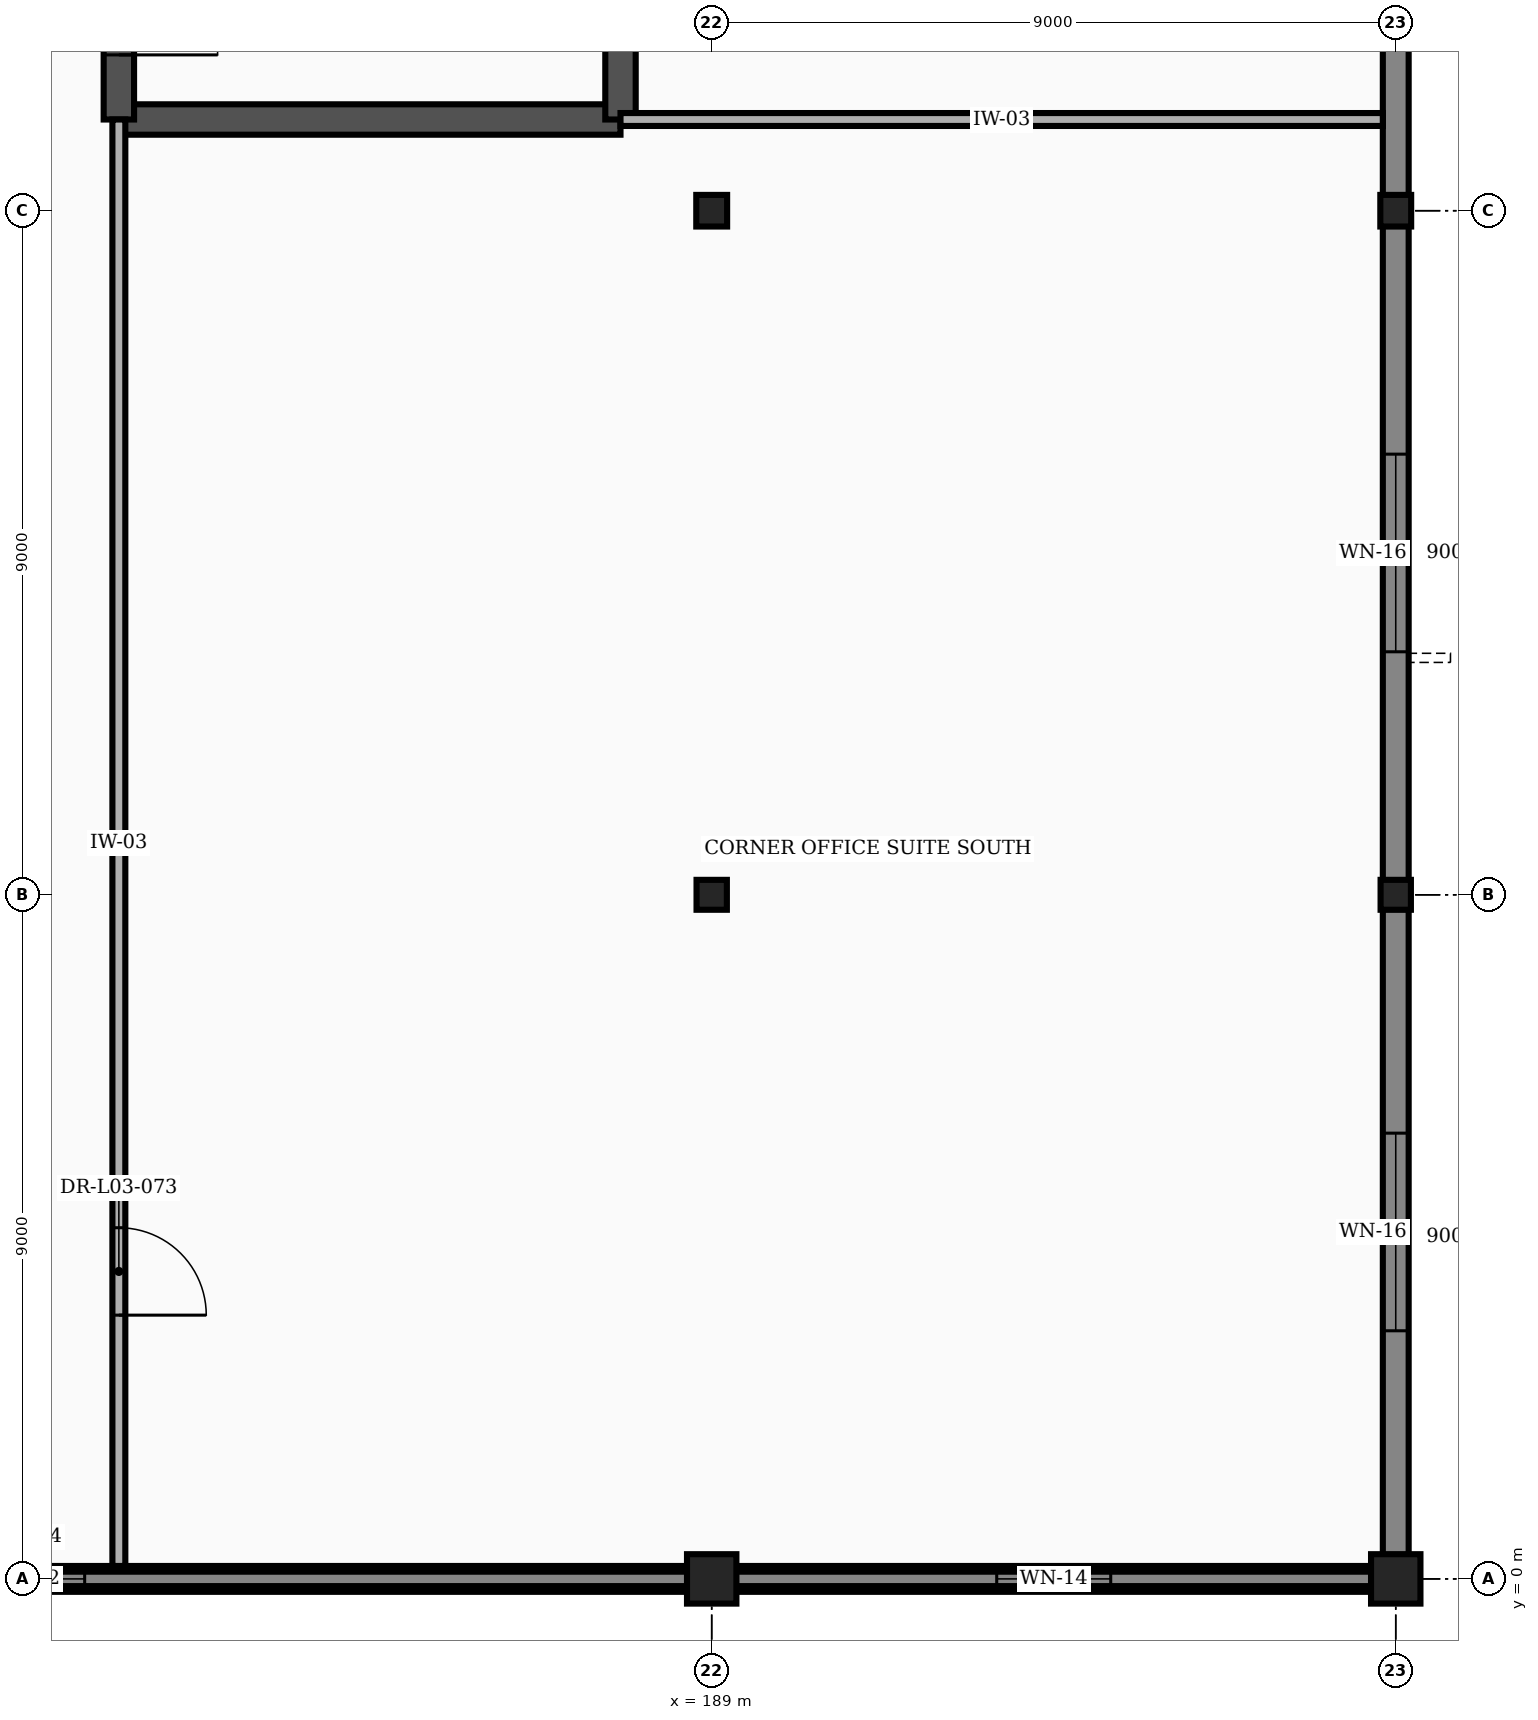
"""IFC4 building model, lengths in metres.
Left out: names, types, materials, properties, quantities, classifications, styles, units other than length and angle.
Written with IfcOpenShell. Run it as: python <this file> out.ifc"""

import sys

from ifc_helpers import new_model, si_unit, direction, frame, frame_2d, origin, origin_2d, place, context, subcontext, project, spatial, rectangle, i_section, extrude, element, fill, save


model = new_model("IFC4")
c1 = context("Model", 3, precision=1e-05, world=origin(), true_north=direction((0.0, 1.0)))
c2 = subcontext(c1, "Body", "Model", "MODEL_VIEW")
j1 = project(units=[si_unit("LENGTHUNIT", "METRE"), si_unit("PLANEANGLEUNIT", "RADIAN")], contexts=[c1])
p1 = place(None, origin())
s1 = spatial("IfcSite", under=j1, at=p1, CompositionType="ELEMENT")
p2 = place(p1, origin())
s2 = spatial("IfcBuilding", under=s1, at=p2, CompositionType="ELEMENT")
p3 = place(p2, frame((0.0, 0.0, 16.8)))
s3 = spatial("IfcBuildingStorey", under=s2, at=p3, CompositionType="ELEMENT", Elevation=16.8)
p4 = place(p3, frame((189.0, 0.0, 0.0), z_axis=(0.0, 0.0, 1.0), x_axis=(1.0, 0.0, 0.0)))
e1 = element("IfcColumn", 1, at=p4, inside=s3, PredefinedType="COLUMN", context=c2, shape_type="SweptSolid", body=[
    extrude(rectangle(XDim=0.65, YDim=0.65, at=origin_2d()), origin(), (0.0, 0.0, 1.0), 4.8),
])
p5 = place(p3, frame((189.0, 9.0, 0.0), z_axis=(0.0, 0.0, 1.0), x_axis=(1.0, 0.0, 0.0)))
e2 = element("IfcColumn", 2, at=p5, inside=s3, PredefinedType="COLUMN", context=c2, shape_type="SweptSolid", body=[
    extrude(i_section(OverallWidth=0.399, OverallDepth=0.394, WebThickness=0.023, FlangeThickness=0.037, at=origin_2d()), origin(), (0.0, 0.0, 1.0), 4.8),
])
p6 = place(p3, frame((189.0, 18.0, 0.0), z_axis=(0.0, 0.0, 1.0), x_axis=(1.0, 0.0, 0.0)))
e3 = element("IfcColumn", 3, at=p6, inside=s3, PredefinedType="COLUMN", context=c2, shape_type="SweptSolid", body=[
    extrude(i_section(OverallWidth=0.406, OverallDepth=0.416, WebThickness=0.03, FlangeThickness=0.048, at=origin_2d()), origin(), (0.0, 0.0, 1.0), 4.8),
])
p7 = place(p3, frame((198.0, 0.0, 0.0), z_axis=(0.0, 0.0, 1.0), x_axis=(1.0, 0.0, 0.0)))
e4 = element("IfcColumn", 4, at=p7, inside=s3, PredefinedType="COLUMN", context=c2, shape_type="SweptSolid", body=[
    extrude(rectangle(XDim=0.65, YDim=0.65, at=origin_2d()), origin(), (0.0, 0.0, 1.0), 4.8),
])
p8 = place(p3, frame((198.0, 9.0, 0.0), z_axis=(0.0, 0.0, 1.0), x_axis=(1.0, 0.0, 0.0)))
e5 = element("IfcColumn", 5, at=p8, inside=s3, PredefinedType="COLUMN", context=c2, shape_type="SweptSolid", body=[
    extrude(i_section(OverallWidth=0.399, OverallDepth=0.394, WebThickness=0.023, FlangeThickness=0.037, at=origin_2d()), origin(), (0.0, 0.0, 1.0), 4.8),
])
p9 = place(p3, frame((198.0, 18.0, 0.0), z_axis=(0.0, 0.0, 1.0), x_axis=(1.0, 0.0, 0.0)))
e6 = element("IfcColumn", 6, at=p9, inside=s3, PredefinedType="COLUMN", context=c2, shape_type="SweptSolid", body=[
    extrude(i_section(OverallWidth=0.406, OverallDepth=0.416, WebThickness=0.03, FlangeThickness=0.048, at=origin_2d()), origin(), (0.0, 0.0, 1.0), 4.8),
])
p10 = place(p3, frame((171.317, 0.0, 0.0), z_axis=(0.0, 0.0, 1.0), x_axis=(1.0, 0.0, 0.0)))
e7 = element("IfcWall", 7, at=p10, inside=s3, PredefinedType="STANDARD", context=c2, shape_type="SweptSolid", body=[
    extrude(rectangle(XDim=17.366, YDim=0.34, at=frame_2d((8.683, 0.0))), origin(), (0.0, 0.0, 1.0), 4.048),
])
p11 = place(p10, frame((7.933, 0.0, 0.85)))
e8 = element("IfcOpeningElement", 8, at=p11, cuts=e7, PredefinedType="OPENING", context=c2, shape_type="SweptSolid", body=[
    extrude(rectangle(XDim=1.5, YDim=1.8, at=frame_2d((0.75, 0.9))), frame((0.0, 0.182, 0.0), z_axis=(0.0, -1.0, 0.0), x_axis=(1.0, 0.0, 0.0)), (0.0, 0.0, 1.0), 0.364),
])
p12 = place(p3, frame((189.317, 0.0, 0.0), z_axis=(0.0, 0.0, 1.0), x_axis=(1.0, 0.0, 0.0)))
e9 = element("IfcWall", 9, at=p12, inside=s3, PredefinedType="STANDARD", context=c2, shape_type="SweptSolid", body=[
    extrude(rectangle(XDim=8.366, YDim=0.34, at=frame_2d((4.183, 0.0))), origin(), (0.0, 0.0, 1.0), 4.048),
])
p13 = place(p12, frame((3.433, 0.0, 0.85)))
e10 = element("IfcOpeningElement", 10, at=p13, cuts=e9, PredefinedType="OPENING", context=c2, shape_type="SweptSolid", body=[
    extrude(rectangle(XDim=1.5, YDim=1.8, at=frame_2d((0.75, 0.9))), frame((0.0, 0.182, 0.0), z_axis=(0.0, -1.0, 0.0), x_axis=(1.0, 0.0, 0.0)), (0.0, 0.0, 1.0), 0.364),
])
p14 = place(p3, frame((198.0, 0.317, 0.0), z_axis=(0.0, 0.0, 1.0), x_axis=(0.0, 1.0, 0.0)))
e11 = element("IfcWall", 11, at=p14, inside=s3, PredefinedType="STANDARD", context=c2, shape_type="SweptSolid", body=[
    extrude(rectangle(XDim=8.495, YDim=0.34, at=frame_2d((4.247, 0.0))), origin(), (0.0, 0.0, 1.0), 4.048),
])
p15 = place(p14, frame((2.947, 0.0, 0.85)))
e12 = element("IfcOpeningElement", 12, at=p15, cuts=e11, PredefinedType="OPENING", context=c2, shape_type="SweptSolid", body=[
    extrude(rectangle(XDim=2.6, YDim=2.2, at=frame_2d((1.3, 1.1))), frame((0.0, 0.182, 0.0), z_axis=(0.0, -1.0, 0.0), x_axis=(1.0, 0.0, 0.0)), (0.0, 0.0, 1.0), 0.364),
])
p16 = place(p3, frame((198.0, 9.188, 0.0), z_axis=(0.0, 0.0, 1.0), x_axis=(0.0, 1.0, 0.0)))
e13 = element("IfcWall", 13, at=p16, inside=s3, PredefinedType="STANDARD", context=c2, shape_type="SweptSolid", body=[
    extrude(rectangle(XDim=8.617, YDim=0.34, at=frame_2d((4.309, 0.0))), origin(), (0.0, 0.0, 1.0), 4.555),
])
p17 = place(p16, frame((3.009, 0.0, 0.85)))
e14 = element("IfcOpeningElement", 14, at=p17, cuts=e13, PredefinedType="OPENING", context=c2, shape_type="SweptSolid", body=[
    extrude(rectangle(XDim=2.6, YDim=2.2, at=frame_2d((1.3, 1.1))), frame((0.0, 0.182, 0.0), z_axis=(0.0, -1.0, 0.0), x_axis=(1.0, 0.0, 0.0)), (0.0, 0.0, 1.0), 0.364),
])
p18 = place(p3, frame((198.0, 18.194, 0.0), z_axis=(0.0, 0.0, 1.0), x_axis=(0.0, 1.0, 0.0)))
e15 = element("IfcWall", 15, at=p18, inside=s3, PredefinedType="STANDARD", context=c2, shape_type="SweptSolid", body=[
    extrude(rectangle(XDim=17.612, YDim=0.34, at=frame_2d((8.806, 0.0))), origin(), (0.0, 0.0, 1.0), 3.943),
])
p19 = place(p18, frame((7.506, 0.0, 0.85)))
e16 = element("IfcOpeningElement", 16, at=p19, cuts=e15, PredefinedType="OPENING", context=c2, shape_type="SweptSolid", body=[
    extrude(rectangle(XDim=2.6, YDim=2.2, at=frame_2d((1.3, 1.1))), frame((0.0, 0.182, 0.0), z_axis=(0.0, -1.0, 0.0), x_axis=(1.0, 0.0, 0.0)), (0.0, 0.0, 1.0), 0.364),
])
p20 = place(p3, frame((153.0, 0.0, 4.8), z_axis=(0.0, 0.0, 1.0), x_axis=(1.0, 0.0, 0.0)))
e17 = element("IfcWall", 17, at=p20, inside=s3, PredefinedType="PARAPET", context=c2, shape_type="SweptSolid", body=[
    extrude(rectangle(XDim=45.0, YDim=0.19, at=frame_2d((22.5, 0.0))), origin(), (0.0, 0.0, 1.0), 1.2),
])
p21 = place(p3, frame((181.2, 19.2, 0.0), z_axis=(0.0, 0.0, 1.0), x_axis=(1.0, 0.0, 0.0)))
e18 = element("IfcWall", 18, at=p21, inside=s3, PredefinedType="SHEAR", context=c2, shape_type="SweptSolid", body=[
    extrude(rectangle(XDim=6.6, YDim=0.4, at=frame_2d((3.3, 0.0))), origin(), (0.0, 0.0, 1.0), 4.555),
])
p22 = place(p3, frame((187.8, 19.2, 0.0), z_axis=(0.0, 0.0, 1.0), x_axis=(0.0, 1.0, 0.0)))
e19 = element("IfcWall", 19, at=p22, inside=s3, PredefinedType="SHEAR", context=c2, shape_type="SweptSolid", body=[
    extrude(rectangle(XDim=15.6, YDim=0.4, at=frame_2d((7.8, 0.0))), origin(), (0.0, 0.0, 1.0), 4.555),
])
p23 = place(p3, frame((181.2, 19.2, 0.0), z_axis=(0.0, 0.0, 1.0), x_axis=(0.0, 1.0, 0.0)))
e20 = element("IfcWall", 20, at=p23, inside=s3, PredefinedType="SHEAR", context=c2, shape_type="SweptSolid", body=[
    extrude(rectangle(XDim=9.56, YDim=0.4, at=frame_2d((4.78, 0.0))), origin(), (0.0, 0.0, 1.0), 4.555),
])
p24 = place(p23, frame((0.85, 0.0, 0.0)))
e21 = element("IfcOpeningElement", 21, at=p24, cuts=e20, PredefinedType="OPENING", context=c2, shape_type="SweptSolid", body=[
    extrude(rectangle(XDim=1.3, YDim=2.2, at=frame_2d((0.65, 1.1))), frame((0.0, 0.212, 0.0), z_axis=(0.0, -1.0, 0.0), x_axis=(1.0, 0.0, 0.0)), (0.0, 0.0, 1.0), 0.424),
])
p25 = place(p3, frame((187.8, 19.2, 0.0), z_axis=(0.0, 0.0, 1.0), x_axis=(1.0, 0.0, 0.0)))
e22 = element("IfcWall", 22, at=p25, inside=s3, PredefinedType="PARTITIONING", context=c2, shape_type="SweptSolid", body=[
    extrude(rectangle(XDim=10.03, YDim=0.17, at=frame_2d((5.015, 0.0))), origin(), (0.0, 0.0, 1.0), 4.555),
])
p26 = place(p3, frame((181.2, 0.17, 0.0), z_axis=(0.0, 0.0, 1.0), x_axis=(0.0, 1.0, 0.0)))
e23 = element("IfcWall", 23, at=p26, inside=s3, PredefinedType="PARTITIONING", context=c2, shape_type="SweptSolid", body=[
    extrude(rectangle(XDim=19.03, YDim=0.17, at=frame_2d((9.515, 0.0))), origin(), (0.0, 0.0, 1.0), 4.555),
])
p27 = place(p26, frame((3.3, 0.0, 0.0)))
e24 = element("IfcOpeningElement", 24, at=p27, cuts=e23, PredefinedType="OPENING", context=c2, shape_type="SweptSolid", body=[
    extrude(rectangle(XDim=1.15, YDim=2.15, at=frame_2d((0.575, 1.075))), frame((0.0, 0.097, 0.0), z_axis=(0.0, -1.0, 0.0), x_axis=(1.0, 0.0, 0.0)), (0.0, 0.0, 1.0), 0.194),
])
p28 = place(p11, origin())
e25 = element("IfcWindow", 25, at=p28, inside=s3, PartitioningType="SINGLE_PANEL", PredefinedType="WINDOW", context=c2, shape_type="SweptSolid", body=[
    extrude(rectangle(XDim=1.5, YDim=1.8, at=frame_2d((0.75, 0.9))), frame((0.0, 0.03, 0.0), z_axis=(0.0, -1.0, 0.0), x_axis=(1.0, 0.0, 0.0)), (0.0, 0.0, 1.0), 0.06),
])
fill(e8, e25)
p29 = place(p13, origin())
e26 = element("IfcWindow", 26, at=p29, inside=s3, PartitioningType="SINGLE_PANEL", PredefinedType="WINDOW", context=c2, shape_type="SweptSolid", body=[
    extrude(rectangle(XDim=1.5, YDim=1.8, at=frame_2d((0.75, 0.9))), frame((0.0, 0.03, 0.0), z_axis=(0.0, -1.0, 0.0), x_axis=(1.0, 0.0, 0.0)), (0.0, 0.0, 1.0), 0.06),
])
fill(e10, e26)
p30 = place(p15, origin())
e27 = element("IfcWindow", 27, at=p30, inside=s3, PartitioningType="SINGLE_PANEL", PredefinedType="WINDOW", context=c2, shape_type="SweptSolid", body=[
    extrude(rectangle(XDim=2.6, YDim=2.2, at=frame_2d((1.3, 1.1))), frame((0.0, 0.03, 0.0), z_axis=(0.0, -1.0, 0.0), x_axis=(1.0, 0.0, 0.0)), (0.0, 0.0, 1.0), 0.06),
])
fill(e12, e27)
p31 = place(p17, origin())
e28 = element("IfcWindow", 28, at=p31, inside=s3, PartitioningType="SINGLE_PANEL", PredefinedType="WINDOW", context=c2, shape_type="SweptSolid", body=[
    extrude(rectangle(XDim=2.6, YDim=2.2, at=frame_2d((1.3, 1.1))), frame((0.0, 0.03, 0.0), z_axis=(0.0, -1.0, 0.0), x_axis=(1.0, 0.0, 0.0)), (0.0, 0.0, 1.0), 0.06),
])
fill(e14, e28)
p32 = place(p24, frame((1.3, 0.0, 0.0), z_axis=(0.0, 0.0, 1.0), x_axis=(-1.0, 0.0, 0.0)))
e29 = element("IfcDoor", 29, at=p32, inside=s3, OperationType="SINGLE_SWING_RIGHT", PredefinedType="DOOR", context=c2, shape_type="SweptSolid", body=[
    extrude(rectangle(XDim=1.3, YDim=2.2, at=frame_2d((0.65, 1.1))), frame((0.0, 0.025, 0.0), z_axis=(0.0, -1.0, 0.0), x_axis=(1.0, 0.0, 0.0)), (0.0, 0.0, 1.0), 0.05),
])
fill(e21, e29)
p33 = place(p27, frame((1.15, 0.0, 0.0), z_axis=(0.0, 0.0, 1.0), x_axis=(-1.0, 0.0, 0.0)))
e30 = element("IfcDoor", 30, at=p33, inside=s3, OperationType="SINGLE_SWING_RIGHT", PredefinedType="DOOR", context=c2, shape_type="SweptSolid", body=[
    extrude(rectangle(XDim=1.15, YDim=2.15, at=frame_2d((0.575, 1.075))), frame((0.0, 0.025, 0.0), z_axis=(0.0, -1.0, 0.0), x_axis=(1.0, 0.0, 0.0)), (0.0, 0.0, 1.0), 0.05),
])
fill(e24, e30)
save(model, sys.argv[1])
